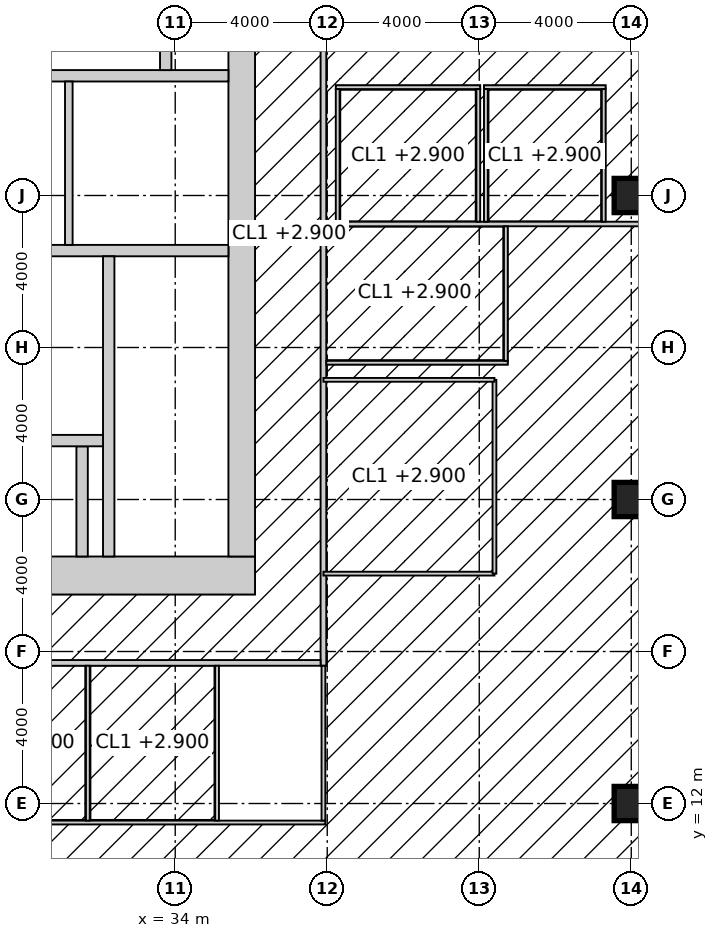
"""IFC4 building model, lengths in metres.
Left out: names, types, materials, properties, quantities, classifications, styles, units other than length and angle.
Written with IfcOpenShell. Run it as: python <this file> out.ifc"""

import sys

from ifc_helpers import new_model, si_unit, direction, frame, frame_2d, origin, origin_2d, place, context, subcontext, project, spatial, rectangle, hollow_rectangle, extrude, element, fill, save


model = new_model("IFC4")
c1 = context("Model", 3, precision=1e-05, world=origin(), true_north=direction((0.0, 1.0)))
c2 = subcontext(c1, "Body", "Model", "MODEL_VIEW")
j1 = project(units=[si_unit("LENGTHUNIT", "METRE"), si_unit("PLANEANGLEUNIT", "RADIAN")], contexts=[c1])
p1 = place(None, origin())
s1 = spatial("IfcSite", under=j1, at=p1, CompositionType="ELEMENT")
p2 = place(p1, origin())
s2 = spatial("IfcBuilding", under=s1, at=p2, CompositionType="ELEMENT")
p3 = place(p2, frame((0.0, 0.0, 93.4)))
s3 = spatial("IfcBuildingStorey", under=s2, at=p3, CompositionType="ELEMENT", Elevation=93.4)
for number, where, z_axis, x_axis in (
    (1, (46.0, 12.0, 0.0), (0.0, 0.0, 1.0), (1.0, 0.0, 0.0)),
    (2, (46.0, 20.0, 0.0), (0.0, 0.0, 1.0), (1.0, 0.0, 0.0)),
    (3, (46.0, 28.0, 0.0), (0.0, 0.0, 1.0), (1.0, 0.0, 0.0)),
):
    element("IfcColumn", number, at=place(p3, frame(where, z_axis=z_axis, x_axis=x_axis)), inside=s3, PredefinedType="COLUMN", context=c2, shape_type="SweptSolid", body=[
        extrude(hollow_rectangle(XDim=0.9, YDim=0.9, WallThickness=0.1, at=origin_2d()), origin(), (0.0, 0.0, 1.0), 4.0),
    ])
p4 = place(p3, frame((18.5, 18.0, -0.15), z_axis=(0.0, 0.0, 1.0), x_axis=(1.0, 0.0, 0.0)))
e4 = element("IfcWall", 4, at=p4, inside=s3, PredefinedType="SHEAR", context=c2, shape_type="SweptSolid", body=[
    extrude(rectangle(XDim=17.6, YDim=1.0, at=frame_2d((8.8, 0.0))), origin(), (0.0, 0.0, 1.0), 4.0),
])
p5 = place(p4, frame((3.45, 0.0, 0.15)))
e5 = element("IfcOpeningElement", 5, at=p5, cuts=e4, PredefinedType="OPENING", context=c2, shape_type="SweptSolid", body=[
    extrude(rectangle(XDim=1.5, YDim=2.4, at=frame_2d((0.75, 1.2))), frame((0.0, 0.51, 0.0), z_axis=(0.0, -1.0, 0.0), x_axis=(1.0, 0.0, 0.0)), (0.0, 0.0, 1.0), 1.02),
])
p6 = place(p3, frame((35.75, 18.5, -0.15), z_axis=(0.0, 0.0, 1.0), x_axis=(0.0, 1.0, 0.0)))
e6 = element("IfcWall", 6, at=p6, inside=s3, PredefinedType="SHEAR", context=c2, shape_type="SweptSolid", body=[
    extrude(rectangle(XDim=17.0, YDim=0.7, at=frame_2d((8.5, 0.0))), origin(), (0.0, 0.0, 1.0), 4.0),
])
p7 = place(p6, frame((9.85, 0.0, 0.15)))
e7 = element("IfcOpeningElement", 7, at=p7, cuts=e6, PredefinedType="OPENING", context=c2, shape_type="SweptSolid", body=[
    extrude(rectangle(XDim=1.0, YDim=2.2, at=frame_2d((0.5, 1.1))), frame((0.0, 0.36, 0.0), z_axis=(0.0, -1.0, 0.0), x_axis=(1.0, 0.0, 0.0)), (0.0, 0.0, 1.0), 0.72),
])
p8 = place(p3, frame((24.15, 26.55, -0.15), z_axis=(0.0, 0.0, 1.0), x_axis=(1.0, 0.0, 0.0)))
e8 = element("IfcWall", 8, at=p8, inside=s3, PredefinedType="SHEAR", context=c2, shape_type="SweptSolid", body=[
    extrude(rectangle(XDim=11.25, YDim=0.3, at=frame_2d((5.625, 0.0))), origin(), (0.0, 0.0, 1.0), 4.0),
])
p9 = place(p8, frame((9.25, 0.0, 0.15)))
e9 = element("IfcOpeningElement", 9, at=p9, cuts=e8, PredefinedType="OPENING", context=c2, shape_type="SweptSolid", body=[
    extrude(rectangle(XDim=1.0, YDim=2.2, at=frame_2d((0.5, 1.1))), frame((0.0, 0.16, 0.0), z_axis=(0.0, -1.0, 0.0), x_axis=(1.0, 0.0, 0.0)), (0.0, 0.0, 1.0), 0.32),
])
p10 = place(p8, frame((4.9, 0.0, 0.15)))
e10 = element("IfcOpeningElement", 10, at=p10, cuts=e8, PredefinedType="OPENING", context=c2, shape_type="SweptSolid", body=[
    extrude(rectangle(XDim=1.5, YDim=2.4, at=frame_2d((0.75, 1.2))), frame((0.0, 0.16, 0.0), z_axis=(0.0, -1.0, 0.0), x_axis=(1.0, 0.0, 0.0)), (0.0, 0.0, 1.0), 0.32),
])
p11 = place(p3, frame((32.25, 18.5, -0.15), z_axis=(0.0, 0.0, 1.0), x_axis=(0.0, 1.0, 0.0)))
e11 = element("IfcWall", 11, at=p11, inside=s3, PredefinedType="SHEAR", context=c2, shape_type="SweptSolid", body=[
    extrude(rectangle(XDim=7.9, YDim=0.3, at=frame_2d((3.95, 0.0))), origin(), (0.0, 0.0, 1.0), 4.0),
])
p12 = place(p3, frame((31.55, 18.5, -0.15), z_axis=(0.0, 0.0, 1.0), x_axis=(0.0, 1.0, 0.0)))
e12 = element("IfcWall", 12, at=p12, inside=s3, PredefinedType="SHEAR", context=c2, shape_type="SweptSolid", body=[
    extrude(rectangle(XDim=2.9, YDim=0.3, at=frame_2d((1.45, 0.0))), origin(), (0.0, 0.0, 1.0), 4.0),
])
p13 = place(p3, frame((28.3, 21.55, -0.15), z_axis=(0.0, 0.0, 1.0), x_axis=(1.0, 0.0, 0.0)))
e13 = element("IfcWall", 13, at=p13, inside=s3, PredefinedType="SHEAR", context=c2, shape_type="SweptSolid", body=[
    extrude(rectangle(XDim=3.8, YDim=0.3, at=frame_2d((1.9, 0.0))), origin(), (0.0, 0.0, 1.0), 4.0),
])
p14 = place(p13, frame((1.05, 0.0, 0.15)))
e14 = element("IfcOpeningElement", 14, at=p14, cuts=e13, PredefinedType="OPENING", context=c2, shape_type="SweptSolid", body=[
    extrude(rectangle(XDim=1.3, YDim=2.4, at=frame_2d((0.65, 1.2))), frame((0.0, 0.16, 0.0), z_axis=(0.0, -1.0, 0.0), x_axis=(1.0, 0.0, 0.0)), (0.0, 0.0, 1.0), 0.32),
])
p15 = place(p3, frame((24.15, 31.15, -0.15), z_axis=(0.0, 0.0, 1.0), x_axis=(1.0, 0.0, 0.0)))
e15 = element("IfcWall", 15, at=p15, inside=s3, PredefinedType="SHEAR", context=c2, shape_type="SweptSolid", body=[
    extrude(rectangle(XDim=11.25, YDim=0.3, at=frame_2d((5.625, 0.0))), origin(), (0.0, 0.0, 1.0), 4.0),
])
p16 = place(p15, frame((7.25, 0.0, 0.15)))
e16 = element("IfcOpeningElement", 16, at=p16, cuts=e15, PredefinedType="OPENING", context=c2, shape_type="SweptSolid", body=[
    extrude(rectangle(XDim=1.4, YDim=2.4, at=frame_2d((0.7, 1.2))), frame((0.0, 0.16, 0.0), z_axis=(0.0, -1.0, 0.0), x_axis=(1.0, 0.0, 0.0)), (0.0, 0.0, 1.0), 0.32),
])
p17 = place(p3, frame((33.75, 31.3, -0.15), z_axis=(0.0, 0.0, 1.0), x_axis=(0.0, 1.0, 0.0)))
e17 = element("IfcWall", 17, at=p17, inside=s3, PredefinedType="SHEAR", context=c2, shape_type="SweptSolid", body=[
    extrude(rectangle(XDim=4.2, YDim=0.3, at=frame_2d((2.1, 0.0))), origin(), (0.0, 0.0, 1.0), 4.0),
])
p18 = place(p3, frame((31.2, 26.7, 0.0), z_axis=(0.0, 0.0, 1.0), x_axis=(0.0, 1.0, 0.0)))
e18 = element("IfcWall", 18, at=p18, inside=s3, PredefinedType="SOLIDWALL", context=c2, shape_type="SweptSolid", body=[
    extrude(rectangle(XDim=4.3, YDim=0.2, at=frame_2d((2.15, 0.0))), origin(), (0.0, 0.0, 1.0), 3.85),
])
p19 = place(p3, frame((37.9, 15.625, 0.0), z_axis=(0.0, 0.0, 1.0), x_axis=(0.0, 1.0, 0.0)))
e19 = element("IfcWall", 19, at=p19, inside=s3, PredefinedType="PARTITIONING", context=c2, shape_type="SweptSolid", body=[
    extrude(rectangle(XDim=22.75, YDim=0.15, at=frame_2d((11.375, 0.0))), origin(), (0.0, 0.0, 1.0), 2.95),
])
p20 = place(p19, frame((4.974, 0.0, 0.0)))
e20 = element("IfcOpeningElement", 20, at=p20, cuts=e19, PredefinedType="OPENING", context=c2, shape_type="SweptSolid", body=[
    extrude(rectangle(XDim=1.8, YDim=2.4, at=frame_2d((0.9, 1.2))), frame((0.0, 0.085, 0.0), z_axis=(0.0, -1.0, 0.0), x_axis=(1.0, 0.0, 0.0)), (0.0, 0.0, 1.0), 0.17),
])
p21 = place(p19, frame((16.226, 0.0, 0.0)))
e21 = element("IfcOpeningElement", 21, at=p21, cuts=e19, PredefinedType="OPENING", context=c2, shape_type="SweptSolid", body=[
    extrude(rectangle(XDim=1.8, YDim=2.4, at=frame_2d((0.9, 1.2))), frame((0.0, 0.085, 0.0), z_axis=(0.0, -1.0, 0.0), x_axis=(1.0, 0.0, 0.0)), (0.0, 0.0, 1.0), 0.17),
])
p22 = place(p3, frame((15.775, 15.7, 0.0), z_axis=(0.0, 0.0, 1.0), x_axis=(1.0, 0.0, 0.0)))
e22 = element("IfcWall", 22, at=p22, inside=s3, PredefinedType="PARTITIONING", context=c2, shape_type="SweptSolid", body=[
    extrude(rectangle(XDim=22.05, YDim=0.15, at=frame_2d((11.025, 0.0))), origin(), (0.0, 0.0, 1.0), 3.85),
])
p23 = place(p3, frame((37.975, 27.25, 0.0), z_axis=(0.0, 0.0, 1.0), x_axis=(1.0, 0.0, 0.0)))
e23 = element("IfcWall", 23, at=p23, inside=s3, PredefinedType="PARTITIONING", context=c2, shape_type="SweptSolid", body=[
    extrude(rectangle(XDim=19.725, YDim=0.12, at=frame_2d((9.862, 0.0))), origin(), (0.0, 0.0, 1.0), 3.85),
])
p24 = place(p3, frame((28.061, 11.5, 0.0), z_axis=(0.0, 0.0, 1.0), x_axis=(1.0, 0.0, 0.0)))
e24 = element("IfcWall", 24, at=p24, inside=s3, PredefinedType="PARTITIONING", context=c2, shape_type="SweptSolid", body=[
    extrude(rectangle(XDim=9.889, YDim=0.1, at=frame_2d((4.944, 0.0))), origin(), (0.0, 0.0, 1.0), 3.85),
])
p25 = place(p24, frame((1.29, 0.0, 0.0)))
e25 = element("IfcOpeningElement", 25, at=p25, cuts=e24, PredefinedType="OPENING", context=c2, shape_type="SweptSolid", body=[
    extrude(rectangle(XDim=1.0, YDim=2.2, at=frame_2d((0.5, 1.1))), frame((0.0, 0.06, 0.0), z_axis=(0.0, -1.0, 0.0), x_axis=(1.0, 0.0, 0.0)), (0.0, 0.0, 1.0), 0.12),
])
p26 = place(p24, frame((4.84, 0.0, 0.0)))
e26 = element("IfcOpeningElement", 26, at=p26, cuts=e24, PredefinedType="OPENING", context=c2, shape_type="SweptSolid", body=[
    extrude(rectangle(XDim=1.0, YDim=2.2, at=frame_2d((0.5, 1.1))), frame((0.0, 0.06, 0.0), z_axis=(0.0, -1.0, 0.0), x_axis=(1.0, 0.0, 0.0)), (0.0, 0.0, 1.0), 0.12),
])
p27 = place(p24, frame((7.939, 0.0, 0.0)))
e27 = element("IfcOpeningElement", 27, at=p27, cuts=e24, PredefinedType="OPENING", context=c2, shape_type="SweptSolid", body=[
    extrude(rectangle(XDim=1.0, YDim=2.2, at=frame_2d((0.5, 1.1))), frame((0.0, 0.06, 0.0), z_axis=(0.0, -1.0, 0.0), x_axis=(1.0, 0.0, 0.0)), (0.0, 0.0, 1.0), 0.12),
])
p28 = place(p3, frame((37.975, 23.599, 0.0), z_axis=(0.0, 0.0, 1.0), x_axis=(1.0, 0.0, 0.0)))
e28 = element("IfcWall", 28, at=p28, inside=s3, PredefinedType="PARTITIONING", context=c2, shape_type="SweptSolid", body=[
    extrude(rectangle(XDim=4.775, YDim=0.1, at=frame_2d((2.387, 0.0))), origin(), (0.0, 0.0, 1.0), 2.95),
])
p29 = place(p3, frame((38.225, 30.85, 0.0), z_axis=(0.0, 0.0, 1.0), x_axis=(1.0, 0.0, 0.0)))
e29 = element("IfcWall", 29, at=p29, inside=s3, PredefinedType="PARTITIONING", context=c2, shape_type="SweptSolid", body=[
    extrude(rectangle(XDim=3.8, YDim=0.1, at=frame_2d((1.9, 0.0))), origin(), (0.0, 0.0, 1.0), 3.85),
])
p30 = place(p29, frame((1.4, 0.0, 0.0)))
e30 = element("IfcOpeningElement", 30, at=p30, cuts=e29, PredefinedType="OPENING", context=c2, shape_type="SweptSolid", body=[
    extrude(rectangle(XDim=1.0, YDim=2.2, at=frame_2d((0.5, 1.1))), frame((0.0, 0.06, 0.0), z_axis=(0.0, -1.0, 0.0), x_axis=(1.0, 0.0, 0.0)), (0.0, 0.0, 1.0), 0.12),
])
p31 = place(p3, frame((42.125, 30.85, 0.0), z_axis=(0.0, 0.0, 1.0), x_axis=(1.0, 0.0, 0.0)))
e31 = element("IfcWall", 31, at=p31, inside=s3, PredefinedType="PARTITIONING", context=c2, shape_type="SweptSolid", body=[
    extrude(rectangle(XDim=3.2, YDim=0.1, at=frame_2d((1.6, 0.0))), origin(), (0.0, 0.0, 1.0), 3.85),
])
p32 = place(p31, frame((1.1, 0.0, 0.0)))
e32 = element("IfcOpeningElement", 32, at=p32, cuts=e31, PredefinedType="OPENING", context=c2, shape_type="SweptSolid", body=[
    extrude(rectangle(XDim=1.0, YDim=2.2, at=frame_2d((0.5, 1.1))), frame((0.0, 0.06, 0.0), z_axis=(0.0, -1.0, 0.0), x_axis=(1.0, 0.0, 0.0)), (0.0, 0.0, 1.0), 0.12),
])
for number, where, z_axis, x_axis in (
    (33, (31.701, 11.55, 0.0), (0.0, 0.0, 1.0), (0.0, 1.0, 0.0)),
    (34, (35.101, 11.55, 0.0), (0.0, 0.0, 1.0), (0.0, 1.0, 0.0)),
):
    element("IfcWall", number, at=place(p3, frame(where, z_axis=z_axis, x_axis=x_axis)), inside=s3, PredefinedType="PARTITIONING", context=c2, shape_type="SweptSolid", body=[
        extrude(rectangle(XDim=4.075, YDim=0.1, at=frame_2d((2.038, 0.0))), origin(), (0.0, 0.0, 1.0), 3.85),
    ])
p33 = place(p3, frame((37.9, 11.55, 0.0), z_axis=(0.0, 0.0, 1.0), x_axis=(0.0, 1.0, 0.0)))
e35 = element("IfcWall", 35, at=p33, inside=s3, PredefinedType="PARTITIONING", context=c2, shape_type="SweptSolid", body=[
    extrude(rectangle(XDim=4.075, YDim=0.1, at=frame_2d((2.038, 0.0))), origin(), (0.0, 0.0, 1.0), 2.95),
])
for number, where, z_axis, x_axis in (
    (36, (38.275, 27.31, 0.0), (0.0, 0.0, 1.0), (0.0, 1.0, 0.0)),
    (37, (41.975, 27.31, 0.0), (0.0, 0.0, 1.0), (0.0, 1.0, 0.0)),
    (38, (42.175, 27.31, 0.0), (0.0, 0.0, 1.0), (0.0, 1.0, 0.0)),
):
    element("IfcWall", number, at=place(p3, frame(where, z_axis=z_axis, x_axis=x_axis)), inside=s3, PredefinedType="PARTITIONING", context=c2, shape_type="SweptSolid", body=[
        extrude(rectangle(XDim=3.49, YDim=0.1, at=frame_2d((1.745, 0.0))), origin(), (0.0, 0.0, 1.0), 3.85),
    ])
p34 = place(p3, frame((42.7, 23.649, 0.0), z_axis=(0.0, 0.0, 1.0), x_axis=(0.0, 1.0, 0.0)))
e39 = element("IfcWall", 39, at=p34, inside=s3, PredefinedType="PARTITIONING", context=c2, shape_type="SweptSolid", body=[
    extrude(rectangle(XDim=3.54, YDim=0.1, at=frame_2d((1.77, 0.0))), origin(), (0.0, 0.0, 1.0), 3.85),
])
p35 = place(p34, frame((1.275, 0.0, 0.0)))
e40 = element("IfcOpeningElement", 40, at=p35, cuts=e39, PredefinedType="OPENING", context=c2, shape_type="SweptSolid", body=[
    extrude(rectangle(XDim=1.0, YDim=2.2, at=frame_2d((0.5, 1.1))), frame((0.0, 0.06, 0.0), z_axis=(0.0, -1.0, 0.0), x_axis=(1.0, 0.0, 0.0)), (0.0, 0.0, 1.0), 0.12),
])
p36 = place(p3, frame((45.275, 27.31, 0.0), z_axis=(0.0, 0.0, 1.0), x_axis=(0.0, 1.0, 0.0)))
e41 = element("IfcWall", 41, at=p36, inside=s3, PredefinedType="PARTITIONING", context=c2, shape_type="SweptSolid", body=[
    extrude(rectangle(XDim=3.49, YDim=0.1, at=frame_2d((1.745, 0.0))), origin(), (0.0, 0.0, 1.0), 3.85),
])
p37 = place(p3, frame((37.9, 18.049, 0.0), z_axis=(0.0, 0.0, 1.0), x_axis=(1.0, 0.0, 0.0)))
e42 = element("IfcWall", 42, at=p37, inside=s3, PredefinedType="PARTITIONING", context=c2, shape_type="SweptSolid", body=[
    extrude(rectangle(XDim=4.5, YDim=0.1, at=frame_2d((2.25, 0.0))), origin(), (0.0, 0.0, 1.0), 3.85),
])
p38 = place(p3, frame((42.4, 18.049, 0.0), z_axis=(0.0, 0.0, 1.0), x_axis=(0.0, 1.0, 0.0)))
e43 = element("IfcWall", 43, at=p38, inside=s3, PredefinedType="PARTITIONING", context=c2, shape_type="SweptSolid", body=[
    extrude(rectangle(XDim=5.1, YDim=0.1, at=frame_2d((2.55, 0.0))), origin(), (0.0, 0.0, 1.0), 3.85),
])
p39 = place(p38, frame((2.05, 0.0, 0.0)))
e44 = element("IfcOpeningElement", 44, at=p39, cuts=e43, PredefinedType="OPENING", context=c2, shape_type="SweptSolid", body=[
    extrude(rectangle(XDim=1.0, YDim=2.2, at=frame_2d((0.5, 1.1))), frame((0.0, 0.06, 0.0), z_axis=(0.0, -1.0, 0.0), x_axis=(1.0, 0.0, 0.0)), (0.0, 0.0, 1.0), 0.12),
])
p40 = place(p3, frame((42.4, 23.149, 0.0), z_axis=(0.0, 0.0, 1.0), x_axis=(-1.0, 0.0, 0.0)))
e45 = element("IfcWall", 45, at=p40, inside=s3, PredefinedType="PARTITIONING", context=c2, shape_type="SweptSolid", body=[
    extrude(rectangle(XDim=4.5, YDim=0.1, at=frame_2d((2.25, 0.0))), origin(), (0.0, 0.0, 1.0), 3.85),
])
p41 = place(p9, frame((1.0, 0.0, 0.0), z_axis=(0.0, 0.0, 1.0), x_axis=(-1.0, 0.0, 0.0)))
e46 = element("IfcDoor", 46, at=p41, inside=s3, OperationType="SINGLE_SWING_RIGHT", PredefinedType="DOOR", context=c2, shape_type="SweptSolid", body=[
    extrude(rectangle(XDim=1.0, YDim=2.2, at=frame_2d((0.5, 1.1))), frame((0.0, 0.025, 0.0), z_axis=(0.0, -1.0, 0.0), x_axis=(1.0, 0.0, 0.0)), (0.0, 0.0, 1.0), 0.05),
])
fill(e9, e46)
p42 = place(p7, origin())
e47 = element("IfcDoor", 47, at=p42, inside=s3, OperationType="SINGLE_SWING_RIGHT", PredefinedType="DOOR", context=c2, shape_type="SweptSolid", body=[
    extrude(rectangle(XDim=1.0, YDim=2.2, at=frame_2d((0.5, 1.1))), frame((0.0, 0.025, 0.0), z_axis=(0.0, -1.0, 0.0), x_axis=(1.0, 0.0, 0.0)), (0.0, 0.0, 1.0), 0.05),
])
fill(e7, e47)
p43 = place(p20, origin())
e48 = element("IfcDoor", 48, at=p43, inside=s3, OperationType="DOUBLE_DOOR_DOUBLE_SWING", PredefinedType="DOOR", context=c2, shape_type="SweptSolid", body=[
    extrude(rectangle(XDim=1.8, YDim=2.4, at=frame_2d((0.9, 1.2))), frame((0.0, 0.025, 0.0), z_axis=(0.0, -1.0, 0.0), x_axis=(1.0, 0.0, 0.0)), (0.0, 0.0, 1.0), 0.05),
])
fill(e20, e48)
p44 = place(p26, origin())
e49 = element("IfcDoor", 49, at=p44, inside=s3, OperationType="SINGLE_SWING_LEFT", PredefinedType="DOOR", context=c2, shape_type="SweptSolid", body=[
    extrude(rectangle(XDim=1.0, YDim=2.2, at=frame_2d((0.5, 1.1))), frame((0.0, 0.025, 0.0), z_axis=(0.0, -1.0, 0.0), x_axis=(1.0, 0.0, 0.0)), (0.0, 0.0, 1.0), 0.05),
])
fill(e26, e49)
p45 = place(p27, origin())
e50 = element("IfcDoor", 50, at=p45, inside=s3, OperationType="SINGLE_SWING_LEFT", PredefinedType="DOOR", context=c2, shape_type="SweptSolid", body=[
    extrude(rectangle(XDim=1.0, YDim=2.2, at=frame_2d((0.5, 1.1))), frame((0.0, 0.025, 0.0), z_axis=(0.0, -1.0, 0.0), x_axis=(1.0, 0.0, 0.0)), (0.0, 0.0, 1.0), 0.05),
])
fill(e27, e50)
p46 = place(p35, origin())
e51 = element("IfcDoor", 51, at=p46, inside=s3, OperationType="SINGLE_SWING_LEFT", PredefinedType="DOOR", context=c2, shape_type="SweptSolid", body=[
    extrude(rectangle(XDim=1.0, YDim=2.2, at=frame_2d((0.5, 1.1))), frame((0.0, 0.025, 0.0), z_axis=(0.0, -1.0, 0.0), x_axis=(1.0, 0.0, 0.0)), (0.0, 0.0, 1.0), 0.05),
])
fill(e40, e51)
p47 = place(p30, origin())
e52 = element("IfcDoor", 52, at=p47, inside=s3, OperationType="SINGLE_SWING_RIGHT", PredefinedType="DOOR", context=c2, shape_type="SweptSolid", body=[
    extrude(rectangle(XDim=1.0, YDim=2.2, at=frame_2d((0.5, 1.1))), frame((0.0, 0.025, 0.0), z_axis=(0.0, -1.0, 0.0), x_axis=(1.0, 0.0, 0.0)), (0.0, 0.0, 1.0), 0.05),
])
fill(e30, e52)
p48 = place(p32, origin())
e53 = element("IfcDoor", 53, at=p48, inside=s3, OperationType="SINGLE_SWING_LEFT", PredefinedType="DOOR", context=c2, shape_type="SweptSolid", body=[
    extrude(rectangle(XDim=1.0, YDim=2.2, at=frame_2d((0.5, 1.1))), frame((0.0, 0.025, 0.0), z_axis=(0.0, -1.0, 0.0), x_axis=(1.0, 0.0, 0.0)), (0.0, 0.0, 1.0), 0.05),
])
fill(e32, e53)
p49 = place(p39, origin())
e54 = element("IfcDoor", 54, at=p49, inside=s3, OperationType="SINGLE_SWING_RIGHT", PredefinedType="DOOR", context=c2, shape_type="SweptSolid", body=[
    extrude(rectangle(XDim=1.0, YDim=2.2, at=frame_2d((0.5, 1.1))), frame((0.0, 0.025, 0.0), z_axis=(0.0, -1.0, 0.0), x_axis=(1.0, 0.0, 0.0)), (0.0, 0.0, 1.0), 0.05),
])
fill(e44, e54)
p50 = place(p16, origin())
e55 = element("IfcDoor", 55, at=p50, inside=s3, OperationType="DOUBLE_DOOR_SLIDING", PredefinedType="DOOR", context=c2, shape_type="SweptSolid", body=[
    extrude(rectangle(XDim=1.4, YDim=2.4, at=frame_2d((0.7, 1.2))), frame((0.0, 0.025, 0.0), z_axis=(0.0, -1.0, 0.0), x_axis=(1.0, 0.0, 0.0)), (0.0, 0.0, 1.0), 0.05),
])
fill(e16, e55)
save(model, sys.argv[1])
